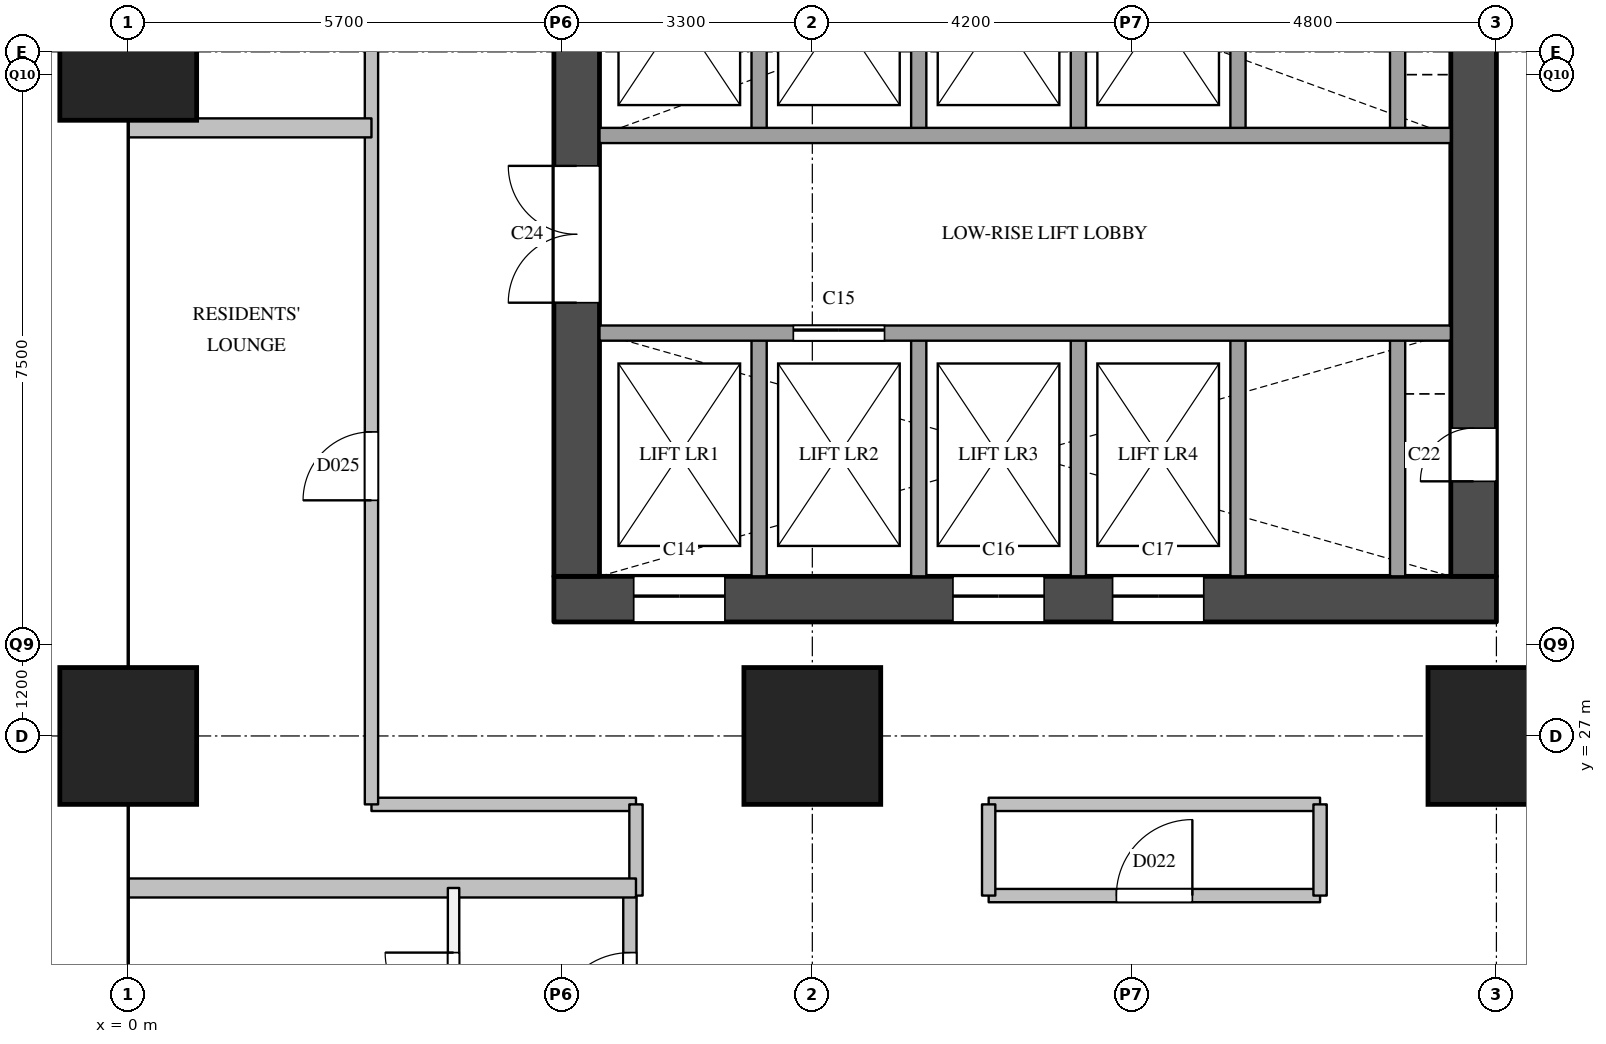
"""IFC4 building model, lengths in metres.
Left out: names, types, materials, properties, quantities, classifications, styles, units other than length and angle.
Written with IfcOpenShell. Run it as: python <this file> out.ifc"""

import sys

from ifc_helpers import new_model, si_unit, direction, frame, frame_2d, origin, origin_2d, place, context, subcontext, project, spatial, rectangle, extrude, element, fill, save


model = new_model("IFC4")
c1 = context("Model", 3, precision=1e-05, world=origin(), true_north=direction((0.0, 1.0)))
c2 = subcontext(c1, "Body", "Model", "MODEL_VIEW")
j1 = project(units=[si_unit("LENGTHUNIT", "METRE"), si_unit("PLANEANGLEUNIT", "RADIAN")], contexts=[c1])
p1 = place(None, origin())
s1 = spatial("IfcSite", under=j1, at=p1, CompositionType="ELEMENT")
p2 = place(p1, origin())
s2 = spatial("IfcBuilding", under=s1, at=p2, CompositionType="ELEMENT")
p3 = place(p2, frame((0.0, 0.0, 50.0)))
s3 = spatial("IfcBuildingStorey", under=s2, at=p3, CompositionType="ELEMENT", Elevation=50.0)
for number, where, z_axis, x_axis in (
    (1, (0.0, 27.0, 0.0), (0.0, 0.0, 1.0), (1.0, 0.0, 0.0)),
    (2, (0.0, 36.0, 0.0), (0.0, 0.0, 1.0), (1.0, 0.0, 0.0)),
    (3, (9.0, 27.0, 0.0), (0.0, 0.0, 1.0), (1.0, 0.0, 0.0)),
    (4, (18.0, 27.0, 0.0), (0.0, 0.0, 1.0), (1.0, 0.0, 0.0)),
):
    element("IfcColumn", number, at=place(p3, frame(where, z_axis=z_axis, x_axis=x_axis)), inside=s3, PredefinedType="COLUMN", context=c2, shape_type="SweptSolid", body=[
        extrude(rectangle(XDim=1.8, YDim=1.8, at=origin_2d()), origin(), (0.0, 0.0, 1.0), 3.8),
    ])
p4 = place(p3, frame((5.6, 28.8, 0.0), z_axis=(0.0, 0.0, 1.0), x_axis=(1.0, 0.0, 0.0)))
e5 = element("IfcWall", 5, at=p4, inside=s3, PredefinedType="SHEAR", context=c2, shape_type="SweptSolid", body=[
    extrude(rectangle(XDim=12.4, YDim=0.6, at=frame_2d((6.2, 0.0))), origin(), (0.0, 0.0, 1.0), 3.5),
])
p5 = place(p4, frame((1.05, 0.0, 0.0)))
e6 = element("IfcOpeningElement", 6, at=p5, cuts=e5, PredefinedType="OPENING", context=c2, shape_type="SweptSolid", body=[
    extrude(rectangle(XDim=1.2, YDim=2.1, at=frame_2d((0.6, 1.05))), frame((0.0, 0.31, 0.0), z_axis=(0.0, -1.0, 0.0), x_axis=(1.0, 0.0, 0.0)), (0.0, 0.0, 1.0), 0.62),
])
p6 = place(p4, frame((5.25, 0.0, 0.0)))
e7 = element("IfcOpeningElement", 7, at=p6, cuts=e5, PredefinedType="OPENING", context=c2, shape_type="SweptSolid", body=[
    extrude(rectangle(XDim=1.2, YDim=2.1, at=frame_2d((0.6, 1.05))), frame((0.0, 0.31, 0.0), z_axis=(0.0, -1.0, 0.0), x_axis=(1.0, 0.0, 0.0)), (0.0, 0.0, 1.0), 0.62),
])
p7 = place(p4, frame((7.35, 0.0, 0.0)))
e8 = element("IfcOpeningElement", 8, at=p7, cuts=e5, PredefinedType="OPENING", context=c2, shape_type="SweptSolid", body=[
    extrude(rectangle(XDim=1.2, YDim=2.1, at=frame_2d((0.6, 1.05))), frame((0.0, 0.31, 0.0), z_axis=(0.0, -1.0, 0.0), x_axis=(1.0, 0.0, 0.0)), (0.0, 0.0, 1.0), 0.62),
])
p8 = place(p3, frame((5.9, 29.1, 0.0), z_axis=(0.0, 0.0, 1.0), x_axis=(0.0, 1.0, 0.0)))
e9 = element("IfcWall", 9, at=p8, inside=s3, PredefinedType="SHEAR", context=c2, shape_type="SweptSolid", body=[
    extrude(rectangle(XDim=20.3, YDim=0.6, at=frame_2d((10.15, 0.0))), origin(), (0.0, 0.0, 1.0), 3.5),
])
p9 = place(p8, frame((3.6, 0.0, 0.0)))
e10 = element("IfcOpeningElement", 10, at=p9, cuts=e9, PredefinedType="OPENING", context=c2, shape_type="SweptSolid", body=[
    extrude(rectangle(XDim=1.8, YDim=2.1, at=frame_2d((0.9, 1.05))), frame((0.0, 0.31, 0.0), z_axis=(0.0, -1.0, 0.0), x_axis=(1.0, 0.0, 0.0)), (0.0, 0.0, 1.0), 0.62),
])
p10 = place(p8, frame((16.4, 0.0, 0.0)))
e11 = element("IfcOpeningElement", 11, at=p10, cuts=e9, PredefinedType="OPENING", context=c2, shape_type="SweptSolid", body=[
    extrude(rectangle(XDim=1.0, YDim=2.1, at=frame_2d((0.5, 1.05))), frame((0.0, 0.31, 0.0), z_axis=(0.0, -1.0, 0.0), x_axis=(1.0, 0.0, 0.0)), (0.0, 0.0, 1.0), 0.62),
])
p11 = place(p3, frame((17.7, 29.1, 0.0), z_axis=(0.0, 0.0, 1.0), x_axis=(0.0, 1.0, 0.0)))
e12 = element("IfcWall", 12, at=p11, inside=s3, PredefinedType="SHEAR", context=c2, shape_type="SweptSolid", body=[
    extrude(rectangle(XDim=20.3, YDim=0.6, at=frame_2d((10.15, 0.0))), origin(), (0.0, 0.0, 1.0), 3.5),
])
p12 = place(p11, frame((1.25, 0.0, 0.0)))
e13 = element("IfcOpeningElement", 13, at=p12, cuts=e12, PredefinedType="OPENING", context=c2, shape_type="SweptSolid", body=[
    extrude(rectangle(XDim=0.7, YDim=2.1, at=frame_2d((0.35, 1.05))), frame((0.0, 0.31, 0.0), z_axis=(0.0, -1.0, 0.0), x_axis=(1.0, 0.0, 0.0)), (0.0, 0.0, 1.0), 0.62),
])
p13 = place(p11, frame((7.05, 0.0, 0.0)))
e14 = element("IfcOpeningElement", 14, at=p13, cuts=e12, PredefinedType="OPENING", context=c2, shape_type="SweptSolid", body=[
    extrude(rectangle(XDim=0.7, YDim=2.1, at=frame_2d((0.35, 1.05))), frame((0.0, 0.31, 0.0), z_axis=(0.0, -1.0, 0.0), x_axis=(1.0, 0.0, 0.0)), (0.0, 0.0, 1.0), 0.62),
])
p14 = place(p3, frame((8.3, 29.1, 0.0), z_axis=(0.0, 0.0, 1.0), x_axis=(0.0, 1.0, 0.0)))
e15 = element("IfcWall", 15, at=p14, inside=s3, PredefinedType="SOLIDWALL", context=c2, shape_type="SweptSolid", body=[
    extrude(rectangle(XDim=3.2, YDim=0.2, at=frame_2d((1.6, 0.0))), origin(), (0.0, 0.0, 1.0), 3.5),
])
p15 = place(p3, frame((8.3, 34.9, 0.0), z_axis=(0.0, 0.0, 1.0), x_axis=(0.0, 1.0, 0.0)))
e16 = element("IfcWall", 16, at=p15, inside=s3, PredefinedType="SOLIDWALL", context=c2, shape_type="SweptSolid", body=[
    extrude(rectangle(XDim=3.2, YDim=0.2, at=frame_2d((1.6, 0.0))), origin(), (0.0, 0.0, 1.0), 3.5),
])
p16 = place(p3, frame((10.4, 29.1, 0.0), z_axis=(0.0, 0.0, 1.0), x_axis=(0.0, 1.0, 0.0)))
e17 = element("IfcWall", 17, at=p16, inside=s3, PredefinedType="SOLIDWALL", context=c2, shape_type="SweptSolid", body=[
    extrude(rectangle(XDim=3.2, YDim=0.2, at=frame_2d((1.6, 0.0))), origin(), (0.0, 0.0, 1.0), 3.5),
])
p17 = place(p3, frame((10.4, 34.9, 0.0), z_axis=(0.0, 0.0, 1.0), x_axis=(0.0, 1.0, 0.0)))
e18 = element("IfcWall", 18, at=p17, inside=s3, PredefinedType="SOLIDWALL", context=c2, shape_type="SweptSolid", body=[
    extrude(rectangle(XDim=3.2, YDim=0.2, at=frame_2d((1.6, 0.0))), origin(), (0.0, 0.0, 1.0), 3.5),
])
p18 = place(p3, frame((12.5, 29.1, 0.0), z_axis=(0.0, 0.0, 1.0), x_axis=(0.0, 1.0, 0.0)))
e19 = element("IfcWall", 19, at=p18, inside=s3, PredefinedType="SOLIDWALL", context=c2, shape_type="SweptSolid", body=[
    extrude(rectangle(XDim=3.2, YDim=0.2, at=frame_2d((1.6, 0.0))), origin(), (0.0, 0.0, 1.0), 3.5),
])
p19 = place(p3, frame((12.5, 34.9, 0.0), z_axis=(0.0, 0.0, 1.0), x_axis=(0.0, 1.0, 0.0)))
e20 = element("IfcWall", 20, at=p19, inside=s3, PredefinedType="SOLIDWALL", context=c2, shape_type="SweptSolid", body=[
    extrude(rectangle(XDim=3.2, YDim=0.2, at=frame_2d((1.6, 0.0))), origin(), (0.0, 0.0, 1.0), 3.5),
])
p20 = place(p3, frame((14.6, 29.1, 0.0), z_axis=(0.0, 0.0, 1.0), x_axis=(0.0, 1.0, 0.0)))
e21 = element("IfcWall", 21, at=p20, inside=s3, PredefinedType="SOLIDWALL", context=c2, shape_type="SweptSolid", body=[
    extrude(rectangle(XDim=3.2, YDim=0.2, at=frame_2d((1.6, 0.0))), origin(), (0.0, 0.0, 1.0), 3.5),
])
p21 = place(p3, frame((14.6, 34.9, 0.0), z_axis=(0.0, 0.0, 1.0), x_axis=(0.0, 1.0, 0.0)))
e22 = element("IfcWall", 22, at=p21, inside=s3, PredefinedType="SOLIDWALL", context=c2, shape_type="SweptSolid", body=[
    extrude(rectangle(XDim=3.2, YDim=0.2, at=frame_2d((1.6, 0.0))), origin(), (0.0, 0.0, 1.0), 3.5),
])
p22 = place(p3, frame((16.7, 29.1, 0.0), z_axis=(0.0, 0.0, 1.0), x_axis=(0.0, 1.0, 0.0)))
e23 = element("IfcWall", 23, at=p22, inside=s3, PredefinedType="SOLIDWALL", context=c2, shape_type="SweptSolid", body=[
    extrude(rectangle(XDim=3.2, YDim=0.2, at=frame_2d((1.6, 0.0))), origin(), (0.0, 0.0, 1.0), 3.5),
])
p23 = place(p3, frame((16.7, 34.9, 0.0), z_axis=(0.0, 0.0, 1.0), x_axis=(0.0, 1.0, 0.0)))
e24 = element("IfcWall", 24, at=p23, inside=s3, PredefinedType="SOLIDWALL", context=c2, shape_type="SweptSolid", body=[
    extrude(rectangle(XDim=3.2, YDim=0.2, at=frame_2d((1.6, 0.0))), origin(), (0.0, 0.0, 1.0), 3.5),
])
p24 = place(p3, frame((6.2, 32.3, 0.0), z_axis=(0.0, 0.0, 1.0), x_axis=(1.0, 0.0, 0.0)))
e25 = element("IfcWall", 25, at=p24, inside=s3, PredefinedType="SOLIDWALL", context=c2, shape_type="SweptSolid", body=[
    extrude(rectangle(XDim=11.2, YDim=0.2, at=frame_2d((5.6, 0.0))), origin(), (0.0, 0.0, 1.0), 3.5),
])
p25 = place(p24, frame((2.55, 0.0, 0.0)))
e26 = element("IfcOpeningElement", 26, at=p25, cuts=e25, PredefinedType="OPENING", context=c2, shape_type="SweptSolid", body=[
    extrude(rectangle(XDim=1.2, YDim=2.1, at=frame_2d((0.6, 1.05))), frame((0.0, 0.11, 0.0), z_axis=(0.0, -1.0, 0.0), x_axis=(1.0, 0.0, 0.0)), (0.0, 0.0, 1.0), 0.22),
])
p26 = place(p3, frame((6.2, 34.9, 0.0), z_axis=(0.0, 0.0, 1.0), x_axis=(1.0, 0.0, 0.0)))
e27 = element("IfcWall", 27, at=p26, inside=s3, PredefinedType="SOLIDWALL", context=c2, shape_type="SweptSolid", body=[
    extrude(rectangle(XDim=11.2, YDim=0.2, at=frame_2d((5.6, 0.0))), origin(), (0.0, 0.0, 1.0), 3.5),
])
p27 = place(p3, frame((6.6, 24.9, 0.0), z_axis=(0.0, 0.0, 1.0), x_axis=(1.0, 0.0, 0.0)))
e28 = element("IfcWall", 28, at=p27, inside=s3, PredefinedType="PARTITIONING", context=c2, shape_type="SweptSolid", body=[
    extrude(rectangle(XDim=0.08, YDim=0.175, at=frame_2d((0.04, 0.0))), origin(), (0.0, 0.0, 1.0), 3.5),
])
p28 = place(p3, frame((11.32, 24.9, 0.0), z_axis=(0.0, 0.0, 1.0), x_axis=(1.0, 0.0, 0.0)))
e29 = element("IfcWall", 29, at=p28, inside=s3, PredefinedType="PARTITIONING", context=c2, shape_type="SweptSolid", body=[
    extrude(rectangle(XDim=4.36, YDim=0.175, at=frame_2d((2.18, 0.0))), origin(), (0.0, 0.0, 1.0), 3.5),
])
p29 = place(p28, frame((1.68, 0.0, 0.0)))
e30 = element("IfcOpeningElement", 30, at=p29, cuts=e29, PredefinedType="OPENING", context=c2, shape_type="SweptSolid", body=[
    extrude(rectangle(XDim=1.0, YDim=2.1, at=frame_2d((0.5, 1.05))), frame((0.0, 0.097, 0.0), z_axis=(0.0, -1.0, 0.0), x_axis=(1.0, 0.0, 0.0)), (0.0, 0.0, 1.0), 0.195),
])
p30 = place(p3, frame((3.2, 26.1, 0.0), z_axis=(0.0, 0.0, 1.0), x_axis=(1.0, 0.0, 0.0)))
e31 = element("IfcWall", 31, at=p30, inside=s3, PredefinedType="PARTITIONING", context=c2, shape_type="SweptSolid", body=[
    extrude(rectangle(XDim=3.48, YDim=0.175, at=frame_2d((1.74, 0.0))), origin(), (0.0, 0.0, 1.0), 3.5),
])
p31 = place(p3, frame((11.32, 26.1, 0.0), z_axis=(0.0, 0.0, 1.0), x_axis=(1.0, 0.0, 0.0)))
e32 = element("IfcWall", 32, at=p31, inside=s3, PredefinedType="PARTITIONING", context=c2, shape_type="SweptSolid", body=[
    extrude(rectangle(XDim=4.36, YDim=0.175, at=frame_2d((2.18, 0.0))), origin(), (0.0, 0.0, 1.0), 3.5),
])
p32 = place(p3, frame((3.2, 26.1, 0.0), z_axis=(0.0, 0.0, 1.0), x_axis=(0.0, 1.0, 0.0)))
e33 = element("IfcWall", 33, at=p32, inside=s3, PredefinedType="PARTITIONING", context=c2, shape_type="SweptSolid", body=[
    extrude(rectangle(XDim=26.3, YDim=0.175, at=frame_2d((13.15, 0.0))), origin(), (0.0, 0.0, 1.0), 2.5),
])
p33 = place(p32, frame((4.0, 0.0, 0.0)))
e34 = element("IfcOpeningElement", 34, at=p33, cuts=e33, PredefinedType="OPENING", context=c2, shape_type="SweptSolid", body=[
    extrude(rectangle(XDim=0.9, YDim=2.1, at=frame_2d((0.45, 1.05))), frame((0.0, 0.097, 0.0), z_axis=(0.0, -1.0, 0.0), x_axis=(1.0, 0.0, 0.0)), (0.0, 0.0, 1.0), 0.195),
])
p34 = place(p32, frame((13.4, 0.0, 0.0)))
e35 = element("IfcOpeningElement", 35, at=p34, cuts=e33, PredefinedType="OPENING", context=c2, shape_type="SweptSolid", body=[
    extrude(rectangle(XDim=1.0, YDim=2.1, at=frame_2d((0.5, 1.05))), frame((0.0, 0.097, 0.0), z_axis=(0.0, -1.0, 0.0), x_axis=(1.0, 0.0, 0.0)), (0.0, 0.0, 1.0), 0.195),
])
p35 = place(p32, frame((22.15, 0.0, 0.0)))
e36 = element("IfcOpeningElement", 36, at=p35, cuts=e33, PredefinedType="OPENING", context=c2, shape_type="SweptSolid", body=[
    extrude(rectangle(XDim=0.9, YDim=2.1, at=frame_2d((0.45, 1.05))), frame((0.0, 0.097, 0.0), z_axis=(0.0, -1.0, 0.0), x_axis=(1.0, 0.0, 0.0)), (0.0, 0.0, 1.0), 0.195),
])
p36 = place(p3, frame((6.6, 6.6, 0.0), z_axis=(0.0, 0.0, 1.0), x_axis=(0.0, 1.0, 0.0)))
e37 = element("IfcWall", 37, at=p36, inside=s3, PredefinedType="PARTITIONING", context=c2, shape_type="SweptSolid", body=[
    extrude(rectangle(XDim=18.3, YDim=0.175, at=frame_2d((9.15, 0.0))), origin(), (0.0, 0.0, 1.0), 3.5),
])
p37 = place(p36, frame((9.1, 0.0, 0.0)))
e38 = element("IfcOpeningElement", 38, at=p37, cuts=e37, PredefinedType="OPENING", context=c2, shape_type="SweptSolid", body=[
    extrude(rectangle(XDim=1.0, YDim=2.1, at=frame_2d((0.5, 1.05))), frame((0.0, 0.097, 0.0), z_axis=(0.0, -1.0, 0.0), x_axis=(1.0, 0.0, 0.0)), (0.0, 0.0, 1.0), 0.195),
])
p38 = place(p36, frame((16.55, 0.0, 0.0)))
e39 = element("IfcOpeningElement", 39, at=p38, cuts=e37, PredefinedType="OPENING", context=c2, shape_type="SweptSolid", body=[
    extrude(rectangle(XDim=1.0, YDim=2.1, at=frame_2d((0.5, 1.05))), frame((0.0, 0.097, 0.0), z_axis=(0.0, -1.0, 0.0), x_axis=(1.0, 0.0, 0.0)), (0.0, 0.0, 1.0), 0.195),
])
for number, where, z_axis, x_axis in (
    (40, (6.68, 24.9, 0.0), (0.0, 0.0, 1.0), (0.0, 1.0, 0.0)),
    (41, (11.32, 24.9, 0.0), (0.0, 0.0, 1.0), (0.0, 1.0, 0.0)),
    (42, (15.68, 24.9, 0.0), (0.0, 0.0, 1.0), (0.0, 1.0, 0.0)),
):
    element("IfcWall", number, at=place(p3, frame(where, z_axis=z_axis, x_axis=x_axis)), inside=s3, PredefinedType="PARTITIONING", context=c2, shape_type="SweptSolid", body=[
        extrude(rectangle(XDim=1.2, YDim=0.175, at=frame_2d((0.6, 0.0))), origin(), (0.0, 0.0, 1.0), 3.5),
    ])
p39 = place(p3, frame((4.28, 22.4, 0.0), z_axis=(0.0, 0.0, 1.0), x_axis=(0.0, 1.0, 0.0)))
e43 = element("IfcWall", 43, at=p39, inside=s3, PredefinedType="PARTITIONING", context=c2, shape_type="SweptSolid", body=[
    extrude(rectangle(XDim=2.6, YDim=0.15, at=frame_2d((1.3, 0.0))), origin(), (0.0, 0.0, 1.0), 3.5),
])
p40 = place(p39, frame((0.85, 0.0, 0.0)))
e44 = element("IfcOpeningElement", 44, at=p40, cuts=e43, PredefinedType="OPENING", context=c2, shape_type="SweptSolid", body=[
    extrude(rectangle(XDim=0.9, YDim=2.1, at=frame_2d((0.45, 1.05))), frame((0.0, 0.085, 0.0), z_axis=(0.0, -1.0, 0.0), x_axis=(1.0, 0.0, 0.0)), (0.0, 0.0, 1.0), 0.17),
])
p41 = place(p3, frame((0.0, 25.0, 0.0), z_axis=(0.0, 0.0, 1.0), x_axis=(1.0, 0.0, 0.0)))
e45 = element("IfcWall", 45, at=p41, inside=s3, PredefinedType="PARTITIONING", context=c2, shape_type="SweptSolid", body=[
    extrude(rectangle(XDim=6.68, YDim=0.25, at=frame_2d((3.34, 0.0))), origin(), (0.0, 0.0, 1.0), 2.5),
])
p42 = place(p3, frame((0.0, 35.0, 0.0), z_axis=(0.0, 0.0, 1.0), x_axis=(1.0, 0.0, 0.0)))
e46 = element("IfcWall", 46, at=p42, inside=s3, PredefinedType="PARTITIONING", context=c2, shape_type="SweptSolid", body=[
    extrude(rectangle(XDim=3.2, YDim=0.25, at=frame_2d((1.6, 0.0))), origin(), (0.0, 0.0, 1.0), 2.5),
])
p43 = place(p5, origin())
e47 = element("IfcDoor", 47, at=p43, inside=s3, OperationType="SLIDING_TO_LEFT", PredefinedType="DOOR", context=c2, shape_type="SweptSolid", body=[
    extrude(rectangle(XDim=1.2, YDim=2.1, at=frame_2d((0.6, 1.05))), frame((0.0, 0.025, 0.0), z_axis=(0.0, -1.0, 0.0), x_axis=(1.0, 0.0, 0.0)), (0.0, 0.0, 1.0), 0.05),
])
fill(e6, e47)
p44 = place(p25, origin())
e48 = element("IfcDoor", 48, at=p44, inside=s3, OperationType="SLIDING_TO_LEFT", PredefinedType="DOOR", context=c2, shape_type="SweptSolid", body=[
    extrude(rectangle(XDim=1.2, YDim=2.1, at=frame_2d((0.6, 1.05))), frame((0.0, 0.025, 0.0), z_axis=(0.0, -1.0, 0.0), x_axis=(1.0, 0.0, 0.0)), (0.0, 0.0, 1.0), 0.05),
])
fill(e26, e48)
p45 = place(p6, origin())
e49 = element("IfcDoor", 49, at=p45, inside=s3, OperationType="SLIDING_TO_LEFT", PredefinedType="DOOR", context=c2, shape_type="SweptSolid", body=[
    extrude(rectangle(XDim=1.2, YDim=2.1, at=frame_2d((0.6, 1.05))), frame((0.0, 0.025, 0.0), z_axis=(0.0, -1.0, 0.0), x_axis=(1.0, 0.0, 0.0)), (0.0, 0.0, 1.0), 0.05),
])
fill(e7, e49)
p46 = place(p7, origin())
e50 = element("IfcDoor", 50, at=p46, inside=s3, OperationType="SLIDING_TO_LEFT", PredefinedType="DOOR", context=c2, shape_type="SweptSolid", body=[
    extrude(rectangle(XDim=1.2, YDim=2.1, at=frame_2d((0.6, 1.05))), frame((0.0, 0.025, 0.0), z_axis=(0.0, -1.0, 0.0), x_axis=(1.0, 0.0, 0.0)), (0.0, 0.0, 1.0), 0.05),
])
fill(e8, e50)
p47 = place(p12, origin())
e51 = element("IfcDoor", 51, at=p47, inside=s3, OperationType="SINGLE_SWING_LEFT", PredefinedType="DOOR", context=c2, shape_type="SweptSolid", body=[
    extrude(rectangle(XDim=0.7, YDim=2.1, at=frame_2d((0.35, 1.05))), frame((0.0, 0.025, 0.0), z_axis=(0.0, -1.0, 0.0), x_axis=(1.0, 0.0, 0.0)), (0.0, 0.0, 1.0), 0.05),
])
fill(e13, e51)
p48 = place(p9, origin())
e52 = element("IfcDoor", 52, at=p48, inside=s3, OperationType="DOUBLE_DOOR_SINGLE_SWING", PredefinedType="DOOR", context=c2, shape_type="SweptSolid", body=[
    extrude(rectangle(XDim=1.8, YDim=2.1, at=frame_2d((0.9, 1.05))), frame((0.0, 0.025, 0.0), z_axis=(0.0, -1.0, 0.0), x_axis=(1.0, 0.0, 0.0)), (0.0, 0.0, 1.0), 0.05),
])
fill(e10, e52)
p49 = place(p38, origin())
e53 = element("IfcDoor", 53, at=p49, inside=s3, OperationType="SINGLE_SWING_LEFT", PredefinedType="DOOR", context=c2, shape_type="SweptSolid", body=[
    extrude(rectangle(XDim=1.0, YDim=2.1, at=frame_2d((0.5, 1.05))), frame((0.0, 0.025, 0.0), z_axis=(0.0, -1.0, 0.0), x_axis=(1.0, 0.0, 0.0)), (0.0, 0.0, 1.0), 0.05),
])
fill(e39, e53)
p50 = place(p40, origin())
e54 = element("IfcDoor", 54, at=p50, inside=s3, OperationType="SINGLE_SWING_RIGHT", PredefinedType="DOOR", context=c2, shape_type="SweptSolid", body=[
    extrude(rectangle(XDim=0.9, YDim=2.1, at=frame_2d((0.45, 1.05))), frame((0.0, 0.025, 0.0), z_axis=(0.0, -1.0, 0.0), x_axis=(1.0, 0.0, 0.0)), (0.0, 0.0, 1.0), 0.05),
])
fill(e44, e54)
p51 = place(p29, origin())
e55 = element("IfcDoor", 55, at=p51, inside=s3, OperationType="SINGLE_SWING_RIGHT", PredefinedType="DOOR", context=c2, shape_type="SweptSolid", body=[
    extrude(rectangle(XDim=1.0, YDim=2.1, at=frame_2d((0.5, 1.05))), frame((0.0, 0.025, 0.0), z_axis=(0.0, -1.0, 0.0), x_axis=(1.0, 0.0, 0.0)), (0.0, 0.0, 1.0), 0.05),
])
fill(e30, e55)
p52 = place(p33, origin())
e56 = element("IfcDoor", 56, at=p52, inside=s3, OperationType="SINGLE_SWING_LEFT", PredefinedType="DOOR", context=c2, shape_type="SweptSolid", body=[
    extrude(rectangle(XDim=0.9, YDim=2.1, at=frame_2d((0.45, 1.05))), frame((0.0, 0.025, 0.0), z_axis=(0.0, -1.0, 0.0), x_axis=(1.0, 0.0, 0.0)), (0.0, 0.0, 1.0), 0.05),
])
fill(e34, e56)
save(model, sys.argv[1])
